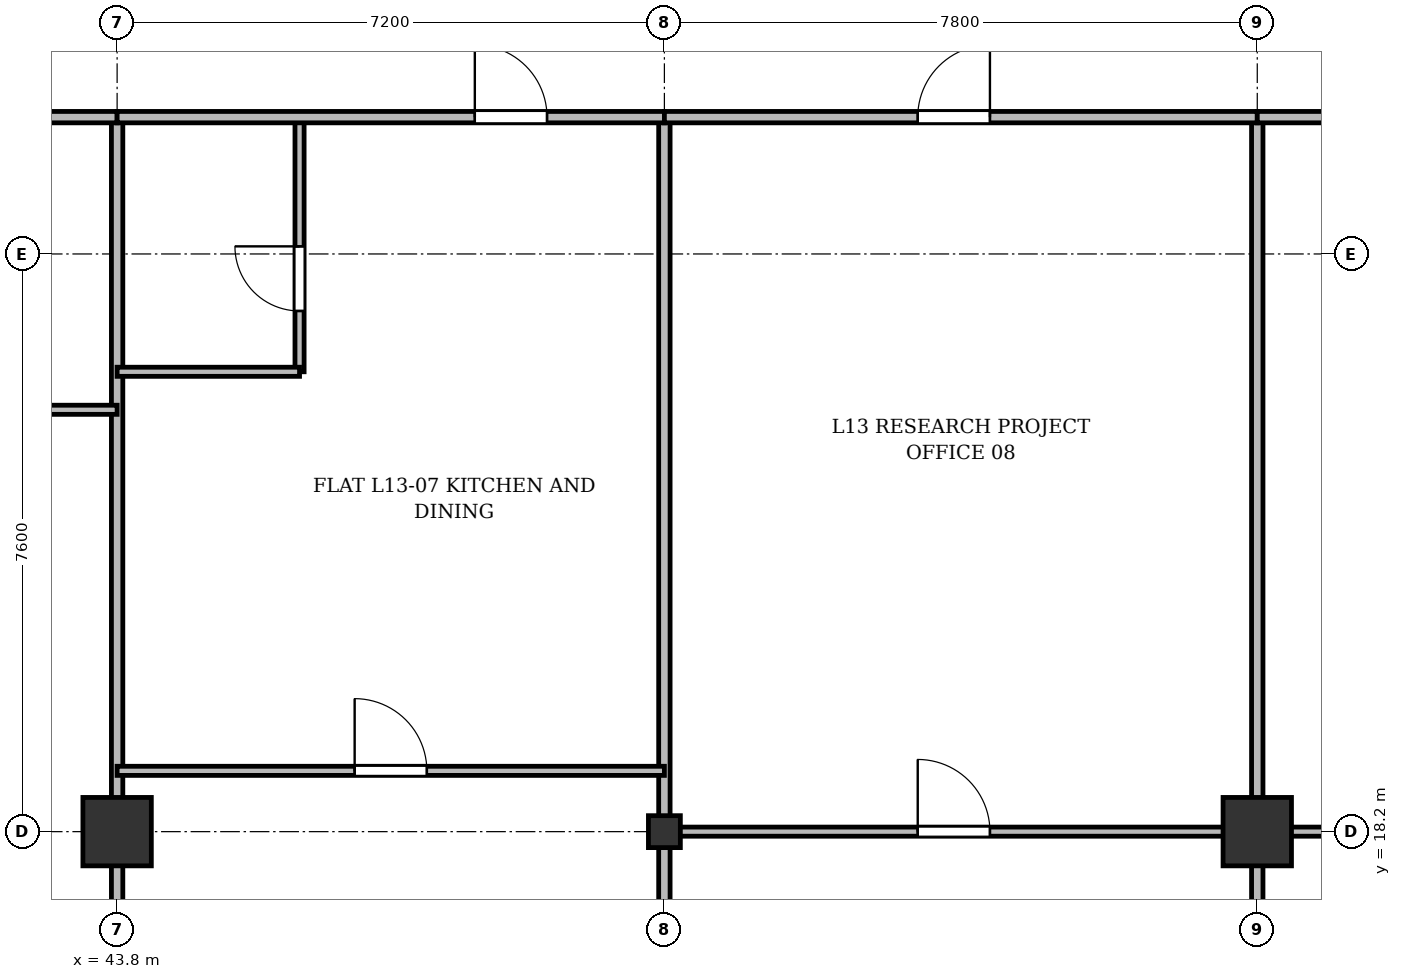
"""IFC4 building model, lengths in metres.
Left out: names, types, materials, properties, quantities, classifications, styles, units other than length and angle.
Written with IfcOpenShell. Run it as: python <this file> out.ifc"""

import sys

from ifc_helpers import new_model, si_unit, direction, frame, frame_2d, origin, origin_2d, place, context, subcontext, project, spatial, rectangle, i_section, extrude, source, transform, mapped, element, fill, save


model = new_model("IFC4")
c1 = context("Model", 3, precision=1e-05, world=origin(), true_north=direction((0.0, 1.0)))
c2 = subcontext(c1, "Body", "Model", "MODEL_VIEW")
j1 = project(units=[si_unit("LENGTHUNIT", "METRE"), si_unit("PLANEANGLEUNIT", "RADIAN")], contexts=[c1])
p1 = place(None, origin())
s1 = spatial("IfcSite", under=j1, at=p1, CompositionType="ELEMENT")
p2 = place(p1, origin())
s2 = spatial("IfcBuilding", under=s1, at=p2, CompositionType="ELEMENT")
p3 = place(p2, frame((0.0, 0.0, 52.3)))
s3 = spatial("IfcBuildingStorey", under=s2, at=p3, CompositionType="ELEMENT", Elevation=52.3)
m1 = source(origin(), c2, "Body", "SweptSolid", [
    extrude(rectangle(XDim=0.9, YDim=0.9, at=origin_2d()), origin(), (0.0, 0.0, 1.0), 3.6),
])
p4 = place(p3, frame((43.8, 18.2, 0.0), z_axis=(0.0, 0.0, 1.0), x_axis=(1.0, 0.0, 0.0)))
e1 = element("IfcColumn", 1, at=p4, inside=s3, PredefinedType="COLUMN", context=c2, shape_type="MappedRepresentation", body=[
    mapped(m1, transform((0.0, 0.0, 0.0), x_axis=(1.0, 0.0, 0.0), y_axis=(0.0, 1.0, 0.0), z_axis=(0.0, 0.0, 1.0), scale=1.0)),
])
m2 = source(origin(), c2, "Body", "SweptSolid", [
    extrude(i_section(OverallWidth=0.42, OverallDepth=0.42, WebThickness=0.026, FlangeThickness=0.04, at=origin_2d()), origin(), (0.0, 0.0, 1.0), 3.6),
])
p5 = place(p3, frame((51.0, 18.2, 0.0), z_axis=(0.0, 0.0, 1.0), x_axis=(1.0, 0.0, 0.0)))
e2 = element("IfcColumn", 2, at=p5, inside=s3, PredefinedType="COLUMN", context=c2, shape_type="MappedRepresentation", body=[
    mapped(m2, transform((0.0, 0.0, 0.0), x_axis=(1.0, 0.0, 0.0), y_axis=(0.0, 1.0, 0.0), z_axis=(0.0, 0.0, 1.0), scale=1.0)),
])
p6 = place(p3, frame((58.8, 18.2, 0.0), z_axis=(0.0, 0.0, 1.0), x_axis=(1.0, 0.0, 0.0)))
e3 = element("IfcColumn", 3, at=p6, inside=s3, PredefinedType="COLUMN", context=c2, shape_type="MappedRepresentation", body=[
    mapped(m1, transform((0.0, 0.0, 0.0), x_axis=(1.0, 0.0, 0.0), y_axis=(0.0, 1.0, 0.0), z_axis=(0.0, 0.0, 1.0), scale=1.0)),
])
for number, where, z_axis, x_axis in (
    (4, (43.8, 3.145, 0.0), (0.0, 0.0, 1.0), (0.0, 1.0, 0.0)),
    (5, (51.0, 3.145, 0.0), (0.0, 0.0, 1.0), (0.0, 1.0, 0.0)),
    (6, (58.8, 3.145, 0.0), (0.0, 0.0, 1.0), (0.0, 1.0, 0.0)),
):
    element("IfcWall", number, at=place(p3, frame(where, z_axis=z_axis, x_axis=x_axis)), inside=s3, PredefinedType="PARTITIONING", context=c2, shape_type="SweptSolid", body=[
        extrude(rectangle(XDim=24.455, YDim=0.15, at=frame_2d((12.228, 0.0))), origin(), (0.0, 0.0, 1.0), 2.752),
    ])
p7 = place(p3, frame((39.0, 27.6, 0.0), z_axis=(0.0, 0.0, 1.0), x_axis=(1.0, 0.0, 0.0)))
e7 = element("IfcWall", 7, at=p7, inside=s3, PredefinedType="PARTITIONING", context=c2, shape_type="SweptSolid", body=[
    extrude(rectangle(XDim=4.8, YDim=0.15, at=frame_2d((2.4, 0.0))), origin(), (0.0, 0.0, 1.0), 2.752),
])
p8 = place(p7, frame((1.834, 0.0, 0.0)))
e8 = element("IfcOpeningElement", 8, at=p8, cuts=e7, PredefinedType="OPENING", context=c2, shape_type="SweptSolid", body=[
    extrude(rectangle(XDim=0.95, YDim=2.15, at=frame_2d((0.475, 1.075))), frame((0.0, 0.085, 0.0), z_axis=(0.0, -1.0, 0.0), x_axis=(1.0, 0.0, 0.0)), (0.0, 0.0, 1.0), 0.17),
])
p9 = place(p3, frame((39.0, 23.75, 0.0), z_axis=(0.0, 0.0, 1.0), x_axis=(1.0, 0.0, 0.0)))
e9 = element("IfcWall", 9, at=p9, inside=s3, PredefinedType="PARTITIONING", context=c2, shape_type="SweptSolid", body=[
    extrude(rectangle(XDim=4.8, YDim=0.12, at=frame_2d((2.4, 0.0))), origin(), (0.0, 0.0, 1.0), 2.752),
])
p10 = place(p9, frame((1.834, 0.0, 0.0)))
e10 = element("IfcOpeningElement", 10, at=p10, cuts=e9, PredefinedType="OPENING", context=c2, shape_type="SweptSolid", body=[
    extrude(rectangle(XDim=0.95, YDim=2.15, at=frame_2d((0.475, 1.075))), frame((0.0, 0.07, 0.0), z_axis=(0.0, -1.0, 0.0), x_axis=(1.0, 0.0, 0.0)), (0.0, 0.0, 1.0), 0.14),
])
p11 = place(p3, frame((43.8, 19.0, 0.0), z_axis=(0.0, 0.0, 1.0), x_axis=(1.0, 0.0, 0.0)))
e11 = element("IfcWall", 11, at=p11, inside=s3, PredefinedType="PARTITIONING", context=c2, shape_type="SweptSolid", body=[
    extrude(rectangle(XDim=7.2, YDim=0.12, at=frame_2d((3.6, 0.0))), origin(), (0.0, 0.0, 1.0), 2.752),
])
p12 = place(p11, frame((3.125, 0.0, 0.0)))
e12 = element("IfcOpeningElement", 12, at=p12, cuts=e11, PredefinedType="OPENING", context=c2, shape_type="SweptSolid", body=[
    extrude(rectangle(XDim=0.95, YDim=2.15, at=frame_2d((0.475, 1.075))), frame((0.0, 0.07, 0.0), z_axis=(0.0, -1.0, 0.0), x_axis=(1.0, 0.0, 0.0)), (0.0, 0.0, 1.0), 0.14),
])
p13 = place(p3, frame((46.2, 24.25, 0.0), z_axis=(0.0, 0.0, 1.0), x_axis=(0.0, 1.0, 0.0)))
e13 = element("IfcWall", 13, at=p13, inside=s3, PredefinedType="PARTITIONING", context=c2, shape_type="SweptSolid", body=[
    extrude(rectangle(XDim=3.35, YDim=0.12, at=frame_2d((1.675, 0.0))), origin(), (0.0, 0.0, 1.0), 2.94),
])
p14 = place(p13, frame((0.8, 0.0, 0.0)))
e14 = element("IfcOpeningElement", 14, at=p14, cuts=e13, PredefinedType="OPENING", context=c2, shape_type="SweptSolid", body=[
    extrude(rectangle(XDim=0.85, YDim=2.1, at=frame_2d((0.425, 1.05))), frame((0.0, 0.07, 0.0), z_axis=(0.0, -1.0, 0.0), x_axis=(1.0, 0.0, 0.0)), (0.0, 0.0, 1.0), 0.14),
])
p15 = place(p3, frame((43.8, 24.25, 0.0), z_axis=(0.0, 0.0, 1.0), x_axis=(1.0, 0.0, 0.0)))
e15 = element("IfcWall", 15, at=p15, inside=s3, PredefinedType="PARTITIONING", context=c2, shape_type="SweptSolid", body=[
    extrude(rectangle(XDim=2.4, YDim=0.12, at=frame_2d((1.2, 0.0))), origin(), (0.0, 0.0, 1.0), 2.752),
])
p16 = place(p3, frame((43.8, 27.6, 0.0), z_axis=(0.0, 0.0, 1.0), x_axis=(1.0, 0.0, 0.0)))
e16 = element("IfcWall", 16, at=p16, inside=s3, PredefinedType="PARTITIONING", context=c2, shape_type="SweptSolid", body=[
    extrude(rectangle(XDim=7.2, YDim=0.15, at=frame_2d((3.6, 0.0))), origin(), (0.0, 0.0, 1.0), 2.752),
])
p17 = place(p16, frame((4.706, 0.0, 0.0)))
e17 = element("IfcOpeningElement", 17, at=p17, cuts=e16, PredefinedType="OPENING", context=c2, shape_type="SweptSolid", body=[
    extrude(rectangle(XDim=0.95, YDim=2.15, at=frame_2d((0.475, 1.075))), frame((0.0, 0.085, 0.0), z_axis=(0.0, -1.0, 0.0), x_axis=(1.0, 0.0, 0.0)), (0.0, 0.0, 1.0), 0.17),
])
p18 = place(p3, frame((51.0, 27.6, 0.0), z_axis=(0.0, 0.0, 1.0), x_axis=(1.0, 0.0, 0.0)))
e18 = element("IfcWall", 18, at=p18, inside=s3, PredefinedType="PARTITIONING", context=c2, shape_type="SweptSolid", body=[
    extrude(rectangle(XDim=7.8, YDim=0.15, at=frame_2d((3.9, 0.0))), origin(), (0.0, 0.0, 1.0), 2.752),
])
p19 = place(p18, frame((3.333, 0.0, 0.0)))
e19 = element("IfcOpeningElement", 19, at=p19, cuts=e18, PredefinedType="OPENING", context=c2, shape_type="SweptSolid", body=[
    extrude(rectangle(XDim=0.95, YDim=2.15, at=frame_2d((0.475, 1.075))), frame((0.0, 0.085, 0.0), z_axis=(0.0, -1.0, 0.0), x_axis=(1.0, 0.0, 0.0)), (0.0, 0.0, 1.0), 0.17),
])
p20 = place(p3, frame((51.0, 18.2, 0.0), z_axis=(0.0, 0.0, 1.0), x_axis=(1.0, 0.0, 0.0)))
e20 = element("IfcWall", 20, at=p20, inside=s3, PredefinedType="PARTITIONING", context=c2, shape_type="SweptSolid", body=[
    extrude(rectangle(XDim=7.8, YDim=0.12, at=frame_2d((3.9, 0.0))), origin(), (0.0, 0.0, 1.0), 2.69),
])
p21 = place(p20, frame((3.333, 0.0, 0.0)))
e21 = element("IfcOpeningElement", 21, at=p21, cuts=e20, PredefinedType="OPENING", context=c2, shape_type="SweptSolid", body=[
    extrude(rectangle(XDim=0.95, YDim=2.15, at=frame_2d((0.475, 1.075))), frame((0.0, 0.07, 0.0), z_axis=(0.0, -1.0, 0.0), x_axis=(1.0, 0.0, 0.0)), (0.0, 0.0, 1.0), 0.14),
])
p22 = place(p3, frame((58.8, 27.6, 0.0), z_axis=(0.0, 0.0, 1.0), x_axis=(1.0, 0.0, 0.0)))
e22 = element("IfcWall", 22, at=p22, inside=s3, PredefinedType="PARTITIONING", context=c2, shape_type="SweptSolid", body=[
    extrude(rectangle(XDim=5.2, YDim=0.15, at=frame_2d((2.6, 0.0))), origin(), (0.0, 0.0, 1.0), 2.752),
])
p23 = place(p22, frame((2.033, 0.0, 0.0)))
e23 = element("IfcOpeningElement", 23, at=p23, cuts=e22, PredefinedType="OPENING", context=c2, shape_type="SweptSolid", body=[
    extrude(rectangle(XDim=0.95, YDim=2.15, at=frame_2d((0.475, 1.075))), frame((0.0, 0.085, 0.0), z_axis=(0.0, -1.0, 0.0), x_axis=(1.0, 0.0, 0.0)), (0.0, 0.0, 1.0), 0.17),
])
p24 = place(p3, frame((58.8, 18.2, 0.0), z_axis=(0.0, 0.0, 1.0), x_axis=(1.0, 0.0, 0.0)))
e24 = element("IfcWall", 24, at=p24, inside=s3, PredefinedType="PARTITIONING", context=c2, shape_type="SweptSolid", body=[
    extrude(rectangle(XDim=5.2, YDim=0.12, at=frame_2d((2.6, 0.0))), origin(), (0.0, 0.0, 1.0), 2.69),
])
p25 = place(p24, frame((2.033, 0.0, 0.0)))
e25 = element("IfcOpeningElement", 25, at=p25, cuts=e24, PredefinedType="OPENING", context=c2, shape_type="SweptSolid", body=[
    extrude(rectangle(XDim=0.95, YDim=2.15, at=frame_2d((0.475, 1.075))), frame((0.0, 0.07, 0.0), z_axis=(0.0, -1.0, 0.0), x_axis=(1.0, 0.0, 0.0)), (0.0, 0.0, 1.0), 0.14),
])
m3 = source(origin(), c2, "Body", "SweptSolid", [
    extrude(rectangle(XDim=0.95, YDim=2.15, at=frame_2d((0.475, 1.075))), frame((0.0, 0.025, 0.0), z_axis=(0.0, -1.0, 0.0), x_axis=(1.0, 0.0, 0.0)), (0.0, 0.0, 1.0), 0.05),
])
p26 = place(p12, origin())
e26 = element("IfcDoor", 26, at=p26, inside=s3, OperationType="SINGLE_SWING_LEFT", PredefinedType="DOOR", context=c2, shape_type="MappedRepresentation", body=[
    mapped(m3, transform((0.0, 0.0, 0.0), x_axis=(1.0, 0.0, 0.0), y_axis=(0.0, 1.0, 0.0), z_axis=(0.0, 0.0, 1.0), scale=1.0)),
])
fill(e12, e26)
m4 = source(origin(), c2, "Body", "SweptSolid", [
    extrude(rectangle(XDim=0.85, YDim=2.1, at=frame_2d((0.425, 1.05))), frame((0.0, 0.025, 0.0), z_axis=(0.0, -1.0, 0.0), x_axis=(1.0, 0.0, 0.0)), (0.0, 0.0, 1.0), 0.05),
])
p27 = place(p14, origin())
e27 = element("IfcDoor", 27, at=p27, inside=s3, OperationType="SINGLE_SWING_RIGHT", PredefinedType="DOOR", context=c2, shape_type="MappedRepresentation", body=[
    mapped(m4, transform((0.0, 0.0, 0.0), x_axis=(1.0, 0.0, 0.0), y_axis=(0.0, 1.0, 0.0), z_axis=(0.0, 0.0, 1.0), scale=1.0)),
])
fill(e14, e27)
p28 = place(p17, origin())
e28 = element("IfcDoor", 28, at=p28, inside=s3, OperationType="SINGLE_SWING_LEFT", PredefinedType="DOOR", context=c2, shape_type="MappedRepresentation", body=[
    mapped(m3, transform((0.0, 0.0, 0.0), x_axis=(1.0, 0.0, 0.0), y_axis=(0.0, 1.0, 0.0), z_axis=(0.0, 0.0, 1.0), scale=1.0)),
])
fill(e17, e28)
p29 = place(p19, origin())
e29 = element("IfcDoor", 29, at=p29, inside=s3, OperationType="SINGLE_SWING_RIGHT", PredefinedType="DOOR", context=c2, shape_type="MappedRepresentation", body=[
    mapped(m3, transform((0.0, 0.0, 0.0), x_axis=(1.0, 0.0, 0.0), y_axis=(0.0, 1.0, 0.0), z_axis=(0.0, 0.0, 1.0), scale=1.0)),
])
fill(e19, e29)
p30 = place(p21, origin())
e30 = element("IfcDoor", 30, at=p30, inside=s3, OperationType="SINGLE_SWING_LEFT", PredefinedType="DOOR", context=c2, shape_type="MappedRepresentation", body=[
    mapped(m3, transform((0.0, 0.0, 0.0), x_axis=(1.0, 0.0, 0.0), y_axis=(0.0, 1.0, 0.0), z_axis=(0.0, 0.0, 1.0), scale=1.0)),
])
fill(e21, e30)
save(model, sys.argv[1])
